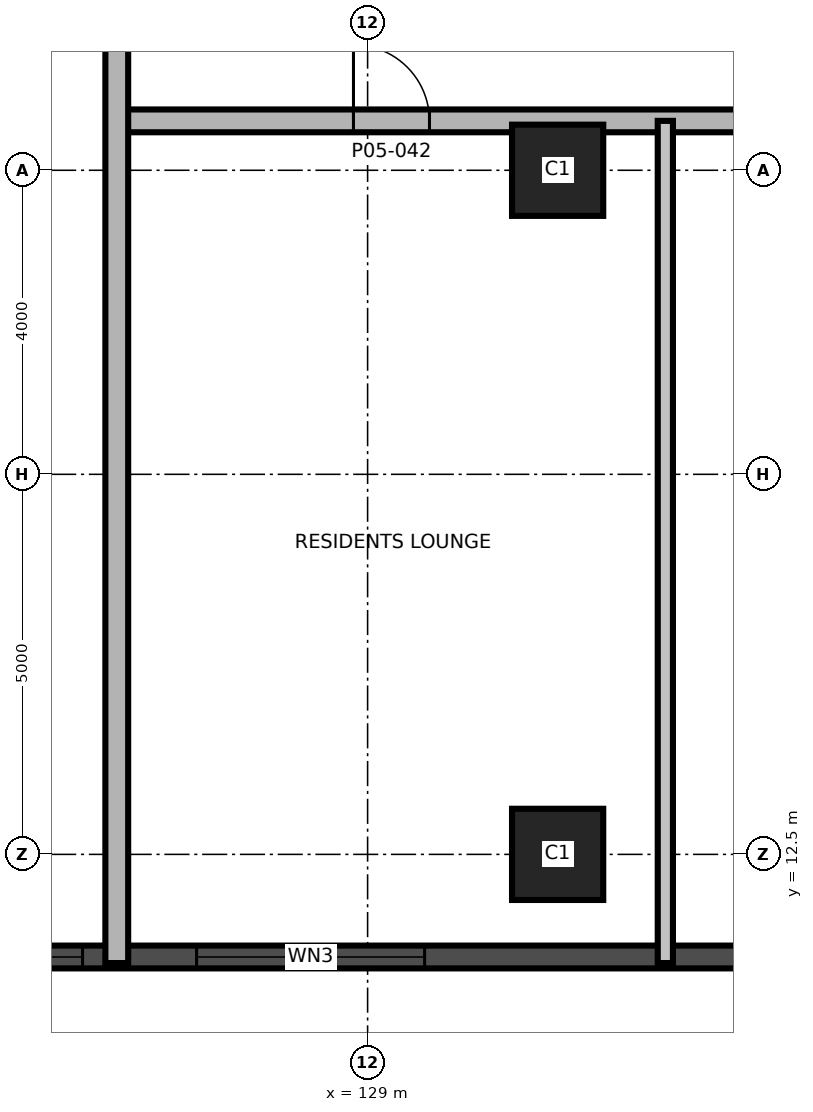
"""IFC4 building model, lengths in metres.
Left out: names, types, materials, properties, quantities, classifications, styles, units other than length and angle.
Written with IfcOpenShell. Run it as: python <this file> out.ifc"""

import sys

from ifc_helpers import new_model, si_unit, direction, frame, frame_2d, origin, origin_2d, place, context, subcontext, project, spatial, rectangle, extrude, element, fill, save


model = new_model("IFC4")
c1 = context("Model", 3, precision=1e-05, world=origin(), true_north=direction((0.0, 1.0)))
c2 = subcontext(c1, "Body", "Model", "MODEL_VIEW")
j1 = project(units=[si_unit("LENGTHUNIT", "METRE"), si_unit("PLANEANGLEUNIT", "RADIAN")], contexts=[c1])
p1 = place(None, origin())
s1 = spatial("IfcSite", under=j1, at=p1, CompositionType="ELEMENT")
p2 = place(p1, origin())
s2 = spatial("IfcBuilding", under=s1, at=p2, CompositionType="ELEMENT")
p3 = place(p2, frame((0.0, 0.0, 28.5)))
s3 = spatial("IfcBuildingStorey", under=s2, at=p3, CompositionType="ELEMENT", Elevation=28.5)
for number, where, z_axis, x_axis in (
    (1, (131.5, 12.5, 0.0), (0.0, 0.0, 1.0), (1.0, 0.0, 0.0)),
    (2, (131.5, 21.5, 0.0), (0.0, 0.0, 1.0), (1.0, 0.0, 0.0)),
):
    element("IfcColumn", number, at=place(p3, frame(where, z_axis=z_axis, x_axis=x_axis)), inside=s3, PredefinedType="COLUMN", context=c2, shape_type="SweptSolid", body=[
        extrude(rectangle(XDim=1.2, YDim=1.2, at=origin_2d()), origin(), (0.0, 0.0, 1.0), 5.0),
    ])
p4 = place(p3, frame((118.048, 11.15, 0.0), z_axis=(0.0, 0.0, 1.0), x_axis=(1.0, 0.0, 0.0)))
e3 = element("IfcWall", 3, at=p4, inside=s3, PredefinedType="SOLIDWALL", context=c2, shape_type="SweptSolid", body=[
    extrude(rectangle(XDim=35.88, YDim=0.3, at=frame_2d((17.94, 0.0))), origin(), (0.0, 0.0, 1.0), 4.7),
])
p5 = place(p4, frame((4.202, 0.0, 0.9)))
e4 = element("IfcOpeningElement", 4, at=p5, cuts=e3, PredefinedType="OPENING", context=c2, shape_type="SweptSolid", body=[
    extrude(rectangle(XDim=3.0, YDim=2.4, at=frame_2d((1.5, 1.2))), frame((0.0, 0.16, 0.0), z_axis=(0.0, -1.0, 0.0), x_axis=(1.0, 0.0, 0.0)), (0.0, 0.0, 1.0), 0.32),
])
p6 = place(p4, frame((8.702, 0.0, 0.9)))
e5 = element("IfcOpeningElement", 5, at=p6, cuts=e3, PredefinedType="OPENING", context=c2, shape_type="SweptSolid", body=[
    extrude(rectangle(XDim=3.0, YDim=2.4, at=frame_2d((1.5, 1.2))), frame((0.0, 0.16, 0.0), z_axis=(0.0, -1.0, 0.0), x_axis=(1.0, 0.0, 0.0)), (0.0, 0.0, 1.0), 0.32),
])
p7 = place(p4, frame((17.702, 0.0, 0.9)))
e6 = element("IfcOpeningElement", 6, at=p7, cuts=e3, PredefinedType="OPENING", context=c2, shape_type="SweptSolid", body=[
    extrude(rectangle(XDim=3.0, YDim=2.4, at=frame_2d((1.5, 1.2))), frame((0.0, 0.16, 0.0), z_axis=(0.0, -1.0, 0.0), x_axis=(1.0, 0.0, 0.0)), (0.0, 0.0, 1.0), 0.32),
])
p8 = place(p4, frame((31.726, 0.0, 0.9)))
e7 = element("IfcOpeningElement", 7, at=p8, cuts=e3, PredefinedType="OPENING", context=c2, shape_type="SweptSolid", body=[
    extrude(rectangle(XDim=3.0, YDim=2.4, at=frame_2d((1.5, 1.2))), frame((0.0, 0.16, 0.0), z_axis=(0.0, -1.0, 0.0), x_axis=(1.0, 0.0, 0.0)), (0.0, 0.0, 1.0), 0.32),
])
p9 = place(p3, frame((125.75, 22.15, 0.0), z_axis=(0.0, 0.0, 1.0), x_axis=(1.0, 0.0, 0.0)))
e8 = element("IfcWall", 8, at=p9, inside=s3, PredefinedType="SHEAR", context=c2, shape_type="SweptSolid", body=[
    extrude(rectangle(XDim=21.5, YDim=0.3, at=frame_2d((10.75, 0.0))), origin(), (0.0, 0.0, 1.0), 3.8),
])
p10 = place(p9, frame((17.0, 0.0, 0.0)))
e9 = element("IfcOpeningElement", 9, at=p10, cuts=e8, PredefinedType="OPENING", context=c2, shape_type="SweptSolid", body=[
    extrude(rectangle(XDim=1.0, YDim=2.1, at=frame_2d((0.5, 1.05))), frame((0.0, 0.16, 0.0), z_axis=(0.0, -1.0, 0.0), x_axis=(1.0, 0.0, 0.0)), (0.0, 0.0, 1.0), 0.32),
])
p11 = place(p9, frame((3.064, 0.0, 0.0)))
e10 = element("IfcOpeningElement", 10, at=p11, cuts=e8, PredefinedType="OPENING", context=c2, shape_type="SweptSolid", body=[
    extrude(rectangle(XDim=1.0, YDim=2.1, at=frame_2d((0.5, 1.05))), frame((0.0, 0.16, 0.0), z_axis=(0.0, -1.0, 0.0), x_axis=(1.0, 0.0, 0.0)), (0.0, 0.0, 1.0), 0.32),
])
p12 = place(p9, frame((9.348, 0.0, 0.0)))
e11 = element("IfcOpeningElement", 11, at=p12, cuts=e8, PredefinedType="OPENING", context=c2, shape_type="SweptSolid", body=[
    extrude(rectangle(XDim=1.0, YDim=2.1, at=frame_2d((0.5, 1.05))), frame((0.0, 0.16, 0.0), z_axis=(0.0, -1.0, 0.0), x_axis=(1.0, 0.0, 0.0)), (0.0, 0.0, 1.0), 0.32),
])
p13 = place(p3, frame((125.7, 11.07, 0.0), z_axis=(0.0, 0.0, 1.0), x_axis=(0.0, 1.0, 0.0)))
e12 = element("IfcWall", 12, at=p13, inside=s3, PredefinedType="SHEAR", context=c2, shape_type="SweptSolid", body=[
    extrude(rectangle(XDim=38.86, YDim=0.3, at=frame_2d((19.43, 0.0))), origin(), (0.0, 0.0, 1.0), 4.65),
])
p14 = place(p13, frame((24.73, 0.0, 0.0)))
e13 = element("IfcOpeningElement", 13, at=p14, cuts=e12, PredefinedType="OPENING", context=c2, shape_type="SweptSolid", body=[
    extrude(rectangle(XDim=1.2, YDim=2.1, at=frame_2d((0.6, 1.05))), frame((0.0, 0.16, 0.0), z_axis=(0.0, -1.0, 0.0), x_axis=(1.0, 0.0, 0.0)), (0.0, 0.0, 1.0), 0.32),
])
p15 = place(p3, frame((132.917, 11.07, 0.0), z_axis=(0.0, 0.0, 1.0), x_axis=(0.0, 1.0, 0.0)))
e14 = element("IfcWall", 14, at=p15, inside=s3, PredefinedType="PARTITIONING", context=c2, shape_type="SweptSolid", body=[
    extrude(rectangle(XDim=11.08, YDim=0.2, at=frame_2d((5.54, 0.0))), origin(), (0.0, 0.0, 1.0), 3.8),
])
p16 = place(p5, origin())
e15 = element("IfcWindow", 15, at=p16, inside=s3, PartitioningType="SINGLE_PANEL", PredefinedType="WINDOW", context=c2, shape_type="SweptSolid", body=[
    extrude(rectangle(XDim=3.0, YDim=2.4, at=frame_2d((1.5, 1.2))), frame((0.0, 0.03, 0.0), z_axis=(0.0, -1.0, 0.0), x_axis=(1.0, 0.0, 0.0)), (0.0, 0.0, 1.0), 0.06),
])
fill(e4, e15)
p17 = place(p6, origin())
e16 = element("IfcWindow", 16, at=p17, inside=s3, PartitioningType="SINGLE_PANEL", PredefinedType="WINDOW", context=c2, shape_type="SweptSolid", body=[
    extrude(rectangle(XDim=3.0, YDim=2.4, at=frame_2d((1.5, 1.2))), frame((0.0, 0.03, 0.0), z_axis=(0.0, -1.0, 0.0), x_axis=(1.0, 0.0, 0.0)), (0.0, 0.0, 1.0), 0.06),
])
fill(e5, e16)
p18 = place(p11, origin())
e17 = element("IfcDoor", 17, at=p18, inside=s3, OperationType="SINGLE_SWING_RIGHT", PredefinedType="DOOR", context=c2, shape_type="SweptSolid", body=[
    extrude(rectangle(XDim=1.0, YDim=2.1, at=frame_2d((0.5, 1.05))), frame((0.0, 0.025, 0.0), z_axis=(0.0, -1.0, 0.0), x_axis=(1.0, 0.0, 0.0)), (0.0, 0.0, 1.0), 0.05),
])
fill(e10, e17)
save(model, sys.argv[1])
